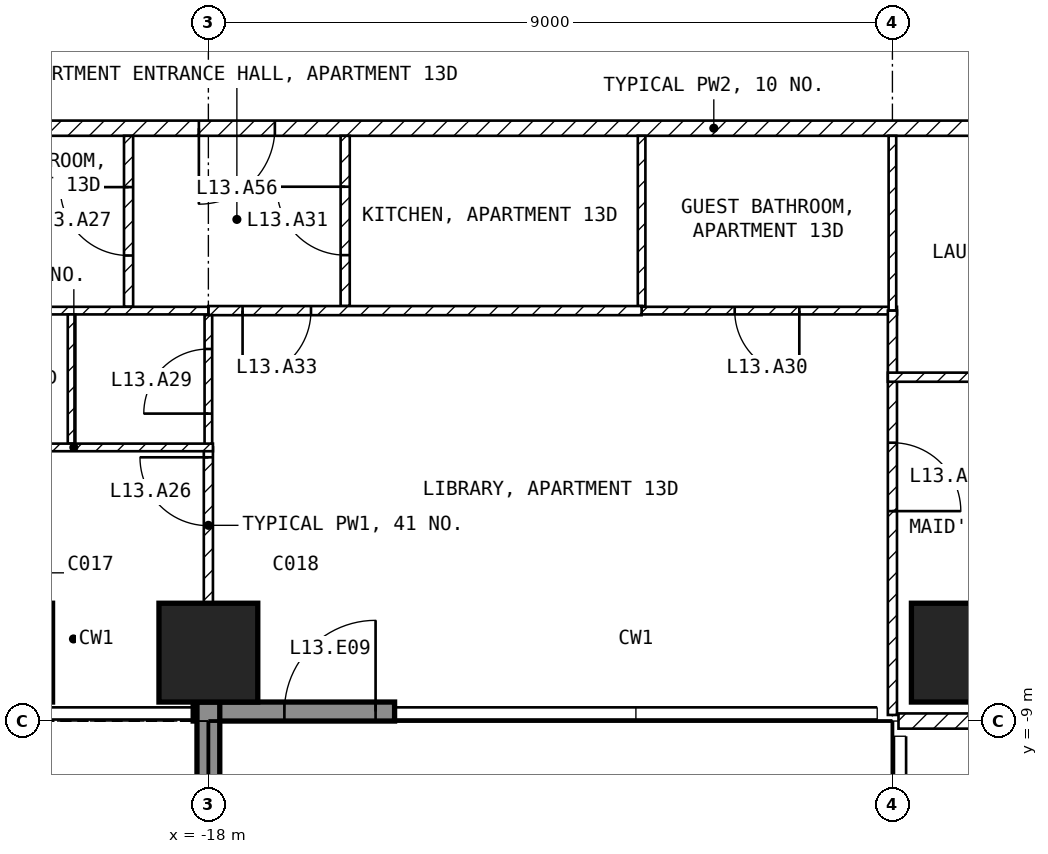
"""IFC4 building model, lengths in metres.
Left out: names, types, materials, properties, quantities, classifications, styles, units other than length and angle.
Written with IfcOpenShell. Run it as: python <this file> out.ifc"""

import sys

from ifc_helpers import new_model, si_unit, direction, frame, frame_2d, origin, origin_2d, place, context, subcontext, project, spatial, rectangle, extrude, element, fill, save


model = new_model("IFC4")
c1 = context("Model", 3, precision=1e-05, world=origin(), true_north=direction((0.0, 1.0)))
c2 = subcontext(c1, "Body", "Model", "MODEL_VIEW")
j1 = project(units=[si_unit("LENGTHUNIT", "METRE"), si_unit("PLANEANGLEUNIT", "RADIAN")], contexts=[c1])
p1 = place(None, origin())
s1 = spatial("IfcSite", under=j1, at=p1, CompositionType="ELEMENT")
p2 = place(p1, origin())
s2 = spatial("IfcBuilding", under=s1, at=p2, CompositionType="ELEMENT")
p3 = place(p2, frame((0.0, 0.0, 64.5)))
s3 = spatial("IfcBuildingStorey", under=s2, at=p3, CompositionType="ELEMENT", Elevation=64.5)
for number, where, z_axis, x_axis in (
    (1, (-20.7, -8.1, -0.25), (0.0, 0.0, 1.0), (1.0, 0.0, 0.0)),
    (2, (-18.0, -8.1, -0.25), (0.0, 0.0, 1.0), (1.0, 0.0, 0.0)),
    (3, (-8.1, -8.1, -0.25), (0.0, 0.0, 1.0), (1.0, 0.0, 0.0)),
):
    element("IfcColumn", number, at=place(p3, frame(where, z_axis=z_axis, x_axis=x_axis)), inside=s3, PredefinedType="COLUMN", context=c2, shape_type="SweptSolid", body=[
        extrude(rectangle(XDim=1.3, YDim=1.3, at=origin_2d()), origin(), (0.0, 0.0, 1.0), 3.5),
    ])
p4 = place(p3, frame((-18.2, -8.875, 0.0), z_axis=(0.0, 0.0, 1.0), x_axis=(1.0, 0.0, 0.0)))
e4 = element("IfcWall", 4, at=p4, inside=s3, PredefinedType="SOLIDWALL", context=c2, shape_type="SweptSolid", body=[
    extrude(rectangle(XDim=2.65, YDim=0.25, at=frame_2d((1.325, 0.0))), origin(), (0.0, 0.0, 1.0), 3.25),
])
p5 = place(p4, frame((1.2, 0.0, 0.0)))
e5 = element("IfcOpeningElement", 5, at=p5, cuts=e4, PredefinedType="OPENING", context=c2, shape_type="SweptSolid", body=[
    extrude(rectangle(XDim=1.2, YDim=2.4, at=frame_2d((0.6, 1.2))), frame((0.0, 0.135, 0.0), z_axis=(0.0, -1.0, 0.0), x_axis=(1.0, 0.0, 0.0)), (0.0, 0.0, 1.0), 0.27),
])
p6 = place(p3, frame((-18.0, -8.75, 0.0), z_axis=(0.0, 0.0, 1.0), x_axis=(0.0, -1.0, 0.0)))
e6 = element("IfcWall", 6, at=p6, inside=s3, PredefinedType="SOLIDWALL", context=c2, shape_type="SweptSolid", body=[
    extrude(rectangle(XDim=2.95, YDim=0.3, at=frame_2d((1.475, 0.0))), origin(), (0.0, 0.0, 1.0), 3.25),
])
p7 = place(p3, frame((-1.1, -1.2, 0.0), z_axis=(0.0, 0.0, 1.0), x_axis=(-1.0, 0.0, 0.0)))
e7 = element("IfcWall", 7, at=p7, inside=s3, PredefinedType="PARTITIONING", context=c2, shape_type="SweptSolid", body=[
    extrude(rectangle(XDim=20.5, YDim=0.2, at=frame_2d((10.25, 0.0))), origin(), (0.0, 0.0, 1.0), 3.25),
])
p8 = place(p7, frame((16.025, 0.0, 0.0)))
e8 = element("IfcOpeningElement", 8, at=p8, cuts=e7, PredefinedType="OPENING", context=c2, shape_type="SweptSolid", body=[
    extrude(rectangle(XDim=1.0, YDim=2.1, at=frame_2d((0.5, 1.05))), frame((0.0, 0.11, 0.0), z_axis=(0.0, -1.0, 0.0), x_axis=(1.0, 0.0, 0.0)), (0.0, 0.0, 1.0), 0.22),
])
p9 = place(p3, frame((8.92, -9.0, 0.0), z_axis=(0.0, 0.0, 1.0), x_axis=(-1.0, 0.0, 0.0)))
e9 = element("IfcWall", 9, at=p9, inside=s3, PredefinedType="PARTITIONING", context=c2, shape_type="SweptSolid", body=[
    extrude(rectangle(XDim=17.84, YDim=0.2, at=frame_2d((8.92, 0.0))), origin(), (0.0, 0.0, 1.0), 3.25),
])
p10 = place(p9, frame((8.42, 0.0, 0.0)))
e10 = element("IfcOpeningElement", 10, at=p10, cuts=e9, PredefinedType="OPENING", context=c2, shape_type="SweptSolid", body=[
    extrude(rectangle(XDim=1.0, YDim=2.1, at=frame_2d((0.5, 1.05))), frame((0.0, 0.11, 0.0), z_axis=(0.0, -1.0, 0.0), x_axis=(1.0, 0.0, 0.0)), (0.0, 0.0, 1.0), 0.22),
])
p11 = place(p3, frame((-12.3, -3.54, 0.0), z_axis=(0.0, 0.0, 1.0), x_axis=(0.0, 1.0, 0.0)))
e11 = element("IfcWall", 11, at=p11, inside=s3, PredefinedType="PARTITIONING", context=c2, shape_type="SweptSolid", body=[
    extrude(rectangle(XDim=2.24, YDim=0.1, at=frame_2d((1.12, 0.0))), origin(), (0.0, 0.0, 1.0), 3.25),
])
p12 = place(p3, frame((-8.94, -3.6, 0.0), z_axis=(0.0, 0.0, 1.0), x_axis=(-1.0, 0.0, 0.0)))
e12 = element("IfcWall", 12, at=p12, inside=s3, PredefinedType="PARTITIONING", context=c2, shape_type="SweptSolid", body=[
    extrude(rectangle(XDim=3.36, YDim=0.1, at=frame_2d((1.68, 0.0))), origin(), (0.0, 0.0, 1.0), 3.25),
])
p13 = place(p12, frame((1.285, 0.0, 0.0)))
e13 = element("IfcOpeningElement", 13, at=p13, cuts=e12, PredefinedType="OPENING", context=c2, shape_type="SweptSolid", body=[
    extrude(rectangle(XDim=0.85, YDim=2.1, at=frame_2d((0.425, 1.05))), frame((0.0, 0.06, 0.0), z_axis=(0.0, -1.0, 0.0), x_axis=(1.0, 0.0, 0.0)), (0.0, 0.0, 1.0), 0.12),
])
p14 = place(p3, frame((-9.0, -1.3, 0.0), z_axis=(0.0, 0.0, 1.0), x_axis=(0.0, -1.0, 0.0)))
e14 = element("IfcWall", 14, at=p14, inside=s3, PredefinedType="PARTITIONING", context=c2, shape_type="SweptSolid", body=[
    extrude(rectangle(XDim=2.3, YDim=0.1, at=frame_2d((1.15, 0.0))), origin(), (0.0, 0.0, 1.0), 3.25),
])
p15 = place(p3, frame((-16.2, -3.54, 0.0), z_axis=(0.0, 0.0, 1.0), x_axis=(0.0, 1.0, 0.0)))
e15 = element("IfcWall", 15, at=p15, inside=s3, PredefinedType="PARTITIONING", context=c2, shape_type="SweptSolid", body=[
    extrude(rectangle(XDim=2.24, YDim=0.12, at=frame_2d((1.12, 0.0))), origin(), (0.0, 0.0, 1.0), 3.25),
])
p16 = place(p15, frame((0.67, 0.0, 0.0)))
e16 = element("IfcOpeningElement", 16, at=p16, cuts=e15, PredefinedType="OPENING", context=c2, shape_type="SweptSolid", body=[
    extrude(rectangle(XDim=0.9, YDim=2.1, at=frame_2d((0.45, 1.05))), frame((0.0, 0.07, 0.0), z_axis=(0.0, -1.0, 0.0), x_axis=(1.0, 0.0, 0.0)), (0.0, 0.0, 1.0), 0.14),
])
p17 = place(p3, frame((-12.3, -3.6, 0.0), z_axis=(0.0, 0.0, 1.0), x_axis=(-1.0, 0.0, 0.0)))
e17 = element("IfcWall", 17, at=p17, inside=s3, PredefinedType="PARTITIONING", context=c2, shape_type="SweptSolid", body=[
    extrude(rectangle(XDim=5.7, YDim=0.12, at=frame_2d((2.85, 0.0))), origin(), (0.0, 0.0, 1.0), 3.25),
])
p18 = place(p17, frame((4.35, 0.0, 0.0)))
e18 = element("IfcOpeningElement", 18, at=p18, cuts=e17, PredefinedType="OPENING", context=c2, shape_type="SweptSolid", body=[
    extrude(rectangle(XDim=0.9, YDim=2.1, at=frame_2d((0.45, 1.05))), frame((0.0, 0.07, 0.0), z_axis=(0.0, -1.0, 0.0), x_axis=(1.0, 0.0, 0.0)), (0.0, 0.0, 1.0), 0.14),
])
p19 = place(p3, frame((-19.05, -3.55, 0.0), z_axis=(0.0, 0.0, 1.0), x_axis=(0.0, 1.0, 0.0)))
e19 = element("IfcWall", 19, at=p19, inside=s3, PredefinedType="PARTITIONING", context=c2, shape_type="SweptSolid", body=[
    extrude(rectangle(XDim=2.25, YDim=0.12, at=frame_2d((1.125, 0.0))), origin(), (0.0, 0.0, 1.0), 3.25),
])
p20 = place(p19, frame((0.675, 0.0, 0.0)))
e20 = element("IfcOpeningElement", 20, at=p20, cuts=e19, PredefinedType="OPENING", context=c2, shape_type="SweptSolid", body=[
    extrude(rectangle(XDim=0.9, YDim=2.1, at=frame_2d((0.45, 1.05))), frame((0.0, 0.07, 0.0), z_axis=(0.0, -1.0, 0.0), x_axis=(1.0, 0.0, 0.0)), (0.0, 0.0, 1.0), 0.14),
])
p21 = place(p3, frame((-18.0, -3.6, 0.0), z_axis=(0.0, 0.0, 1.0), x_axis=(-1.0, 0.0, 0.0)))
e21 = element("IfcWall", 21, at=p21, inside=s3, PredefinedType="PARTITIONING", context=c2, shape_type="SweptSolid", body=[
    extrude(rectangle(XDim=3.6, YDim=0.1, at=frame_2d((1.8, 0.0))), origin(), (0.0, 0.0, 1.0), 3.25),
])
p22 = place(p3, frame((-18.0, -5.4, 0.0), z_axis=(0.0, 0.0, 1.0), x_axis=(0.0, 1.0, 0.0)))
e22 = element("IfcWall", 22, at=p22, inside=s3, PredefinedType="PARTITIONING", context=c2, shape_type="SweptSolid", body=[
    extrude(rectangle(XDim=1.74, YDim=0.1, at=frame_2d((0.87, 0.0))), origin(), (0.0, 0.0, 1.0), 2.346),
])
p23 = place(p22, frame((0.445, 0.0, 0.0)))
e23 = element("IfcOpeningElement", 23, at=p23, cuts=e22, PredefinedType="OPENING", context=c2, shape_type="SweptSolid", body=[
    extrude(rectangle(XDim=0.85, YDim=2.1, at=frame_2d((0.425, 1.05))), frame((0.0, 0.06, 0.0), z_axis=(0.0, -1.0, 0.0), x_axis=(1.0, 0.0, 0.0)), (0.0, 0.0, 1.0), 0.12),
])
p24 = place(p3, frame((-18.0, -7.45, 0.0), z_axis=(0.0, 0.0, 1.0), x_axis=(0.0, 1.0, 0.0)))
e24 = element("IfcWall", 24, at=p24, inside=s3, PredefinedType="PARTITIONING", context=c2, shape_type="SweptSolid", body=[
    extrude(rectangle(XDim=2.05, YDim=0.12, at=frame_2d((1.025, 0.0))), origin(), (0.0, 0.0, 1.0), 2.346),
])
p25 = place(p24, frame((1.02, 0.0, 0.0)))
e25 = element("IfcOpeningElement", 25, at=p25, cuts=e24, PredefinedType="OPENING", context=c2, shape_type="SweptSolid", body=[
    extrude(rectangle(XDim=0.9, YDim=2.1, at=frame_2d((0.45, 1.05))), frame((0.0, 0.07, 0.0), z_axis=(0.0, -1.0, 0.0), x_axis=(1.0, 0.0, 0.0)), (0.0, 0.0, 1.0), 0.14),
])
p26 = place(p3, frame((-9.0, -3.6, 0.0), z_axis=(0.0, 0.0, 1.0), x_axis=(0.0, -1.0, 0.0)))
e26 = element("IfcWall", 26, at=p26, inside=s3, PredefinedType="PARTITIONING", context=c2, shape_type="SweptSolid", body=[
    extrude(rectangle(XDim=5.32, YDim=0.12, at=frame_2d((2.66, 0.0))), origin(), (0.0, 0.0, 1.0), 3.25),
])
p27 = place(p26, frame((1.738, 0.0, 0.0)))
e27 = element("IfcOpeningElement", 27, at=p27, cuts=e26, PredefinedType="OPENING", context=c2, shape_type="SweptSolid", body=[
    extrude(rectangle(XDim=0.9, YDim=2.1, at=frame_2d((0.45, 1.05))), frame((0.0, 0.07, 0.0), z_axis=(0.0, -1.0, 0.0), x_axis=(1.0, 0.0, 0.0)), (0.0, 0.0, 1.0), 0.14),
])
p28 = place(p3, frame((-19.8, -5.35, 0.0), z_axis=(0.0, 0.0, 1.0), x_axis=(0.0, 1.0, 0.0)))
e28 = element("IfcWall", 28, at=p28, inside=s3, PredefinedType="PARTITIONING", context=c2, shape_type="SweptSolid", body=[
    extrude(rectangle(XDim=1.7, YDim=0.1, at=frame_2d((0.85, 0.0))), origin(), (0.0, 0.0, 1.0), 3.25),
])
p29 = place(p3, frame((-17.94, -5.4, 0.0), z_axis=(0.0, 0.0, 1.0), x_axis=(-1.0, 0.0, 0.0)))
e29 = element("IfcWall", 29, at=p29, inside=s3, PredefinedType="PARTITIONING", context=c2, shape_type="SweptSolid", body=[
    extrude(rectangle(XDim=3.66, YDim=0.1, at=frame_2d((1.83, 0.0))), origin(), (0.0, 0.0, 1.0), 3.25),
])
p30 = place(p29, frame((2.335, 0.0, 0.0)))
e30 = element("IfcOpeningElement", 30, at=p30, cuts=e29, PredefinedType="OPENING", context=c2, shape_type="SweptSolid", body=[
    extrude(rectangle(XDim=0.85, YDim=2.1, at=frame_2d((0.425, 1.05))), frame((0.0, 0.06, 0.0), z_axis=(0.0, -1.0, 0.0), x_axis=(1.0, 0.0, 0.0)), (0.0, 0.0, 1.0), 0.12),
])
p31 = place(p3, frame((-4.44, -4.476, 0.0), z_axis=(0.0, 0.0, 1.0), x_axis=(-1.0, 0.0, 0.0)))
e31 = element("IfcWall", 31, at=p31, inside=s3, PredefinedType="PARTITIONING", context=c2, shape_type="SweptSolid", body=[
    extrude(rectangle(XDim=4.62, YDim=0.12, at=frame_2d((2.31, 0.0))), origin(), (0.0, 0.0, 1.0), 3.25),
])
p32 = place(p31, frame((1.86, 0.0, 0.0)))
e32 = element("IfcOpeningElement", 32, at=p32, cuts=e31, PredefinedType="OPENING", context=c2, shape_type="SweptSolid", body=[
    extrude(rectangle(XDim=0.9, YDim=2.1, at=frame_2d((0.45, 1.05))), frame((0.0, 0.07, 0.0), z_axis=(0.0, -1.0, 0.0), x_axis=(1.0, 0.0, 0.0)), (0.0, 0.0, 1.0), 0.14),
])
p33 = place(p5, origin())
e33 = element("IfcDoor", 33, at=p33, inside=s3, OperationType="SINGLE_SWING_RIGHT", PredefinedType="DOOR", context=c2, shape_type="SweptSolid", body=[
    extrude(rectangle(XDim=1.2, YDim=2.4, at=frame_2d((0.6, 1.2))), frame((0.0, 0.025, 0.0), z_axis=(0.0, -1.0, 0.0), x_axis=(1.0, 0.0, 0.0)), (0.0, 0.0, 1.0), 0.05),
])
fill(e5, e33)
p34 = place(p25, origin())
e34 = element("IfcDoor", 34, at=p34, inside=s3, OperationType="SINGLE_SWING_RIGHT", PredefinedType="DOOR", context=c2, shape_type="SweptSolid", body=[
    extrude(rectangle(XDim=0.9, YDim=2.1, at=frame_2d((0.45, 1.05))), frame((0.0, 0.025, 0.0), z_axis=(0.0, -1.0, 0.0), x_axis=(1.0, 0.0, 0.0)), (0.0, 0.0, 1.0), 0.05),
])
fill(e25, e34)
p35 = place(p20, origin())
e35 = element("IfcDoor", 35, at=p35, inside=s3, OperationType="SINGLE_SWING_RIGHT", PredefinedType="DOOR", context=c2, shape_type="SweptSolid", body=[
    extrude(rectangle(XDim=0.9, YDim=2.1, at=frame_2d((0.45, 1.05))), frame((0.0, 0.025, 0.0), z_axis=(0.0, -1.0, 0.0), x_axis=(1.0, 0.0, 0.0)), (0.0, 0.0, 1.0), 0.05),
])
fill(e20, e35)
p36 = place(p23, origin())
e36 = element("IfcDoor", 36, at=p36, inside=s3, OperationType="SINGLE_SWING_LEFT", PredefinedType="DOOR", context=c2, shape_type="SweptSolid", body=[
    extrude(rectangle(XDim=0.85, YDim=2.1, at=frame_2d((0.425, 1.05))), frame((0.0, 0.025, 0.0), z_axis=(0.0, -1.0, 0.0), x_axis=(1.0, 0.0, 0.0)), (0.0, 0.0, 1.0), 0.05),
])
fill(e23, e36)
p37 = place(p13, origin())
e37 = element("IfcDoor", 37, at=p37, inside=s3, OperationType="SINGLE_SWING_LEFT", PredefinedType="DOOR", context=c2, shape_type="SweptSolid", body=[
    extrude(rectangle(XDim=0.85, YDim=2.1, at=frame_2d((0.425, 1.05))), frame((0.0, 0.025, 0.0), z_axis=(0.0, -1.0, 0.0), x_axis=(1.0, 0.0, 0.0)), (0.0, 0.0, 1.0), 0.05),
])
fill(e13, e37)
p38 = place(p16, origin())
e38 = element("IfcDoor", 38, at=p38, inside=s3, OperationType="SINGLE_SWING_RIGHT", PredefinedType="DOOR", context=c2, shape_type="SweptSolid", body=[
    extrude(rectangle(XDim=0.9, YDim=2.1, at=frame_2d((0.45, 1.05))), frame((0.0, 0.025, 0.0), z_axis=(0.0, -1.0, 0.0), x_axis=(1.0, 0.0, 0.0)), (0.0, 0.0, 1.0), 0.05),
])
fill(e16, e38)
p39 = place(p18, origin())
e39 = element("IfcDoor", 39, at=p39, inside=s3, OperationType="SINGLE_SWING_RIGHT", PredefinedType="DOOR", context=c2, shape_type="SweptSolid", body=[
    extrude(rectangle(XDim=0.9, YDim=2.1, at=frame_2d((0.45, 1.05))), frame((0.0, 0.025, 0.0), z_axis=(0.0, -1.0, 0.0), x_axis=(1.0, 0.0, 0.0)), (0.0, 0.0, 1.0), 0.05),
])
fill(e18, e39)
p40 = place(p27, origin())
e40 = element("IfcDoor", 40, at=p40, inside=s3, OperationType="SINGLE_SWING_RIGHT", PredefinedType="DOOR", context=c2, shape_type="SweptSolid", body=[
    extrude(rectangle(XDim=0.9, YDim=2.1, at=frame_2d((0.45, 1.05))), frame((0.0, 0.025, 0.0), z_axis=(0.0, -1.0, 0.0), x_axis=(1.0, 0.0, 0.0)), (0.0, 0.0, 1.0), 0.05),
])
fill(e27, e40)
p41 = place(p8, origin())
e41 = element("IfcDoor", 41, at=p41, inside=s3, OperationType="SINGLE_SWING_RIGHT", PredefinedType="DOOR", context=c2, shape_type="SweptSolid", body=[
    extrude(rectangle(XDim=1.0, YDim=2.1, at=frame_2d((0.5, 1.05))), frame((0.0, 0.025, 0.0), z_axis=(0.0, -1.0, 0.0), x_axis=(1.0, 0.0, 0.0)), (0.0, 0.0, 1.0), 0.05),
])
fill(e8, e41)
save(model, sys.argv[1])
